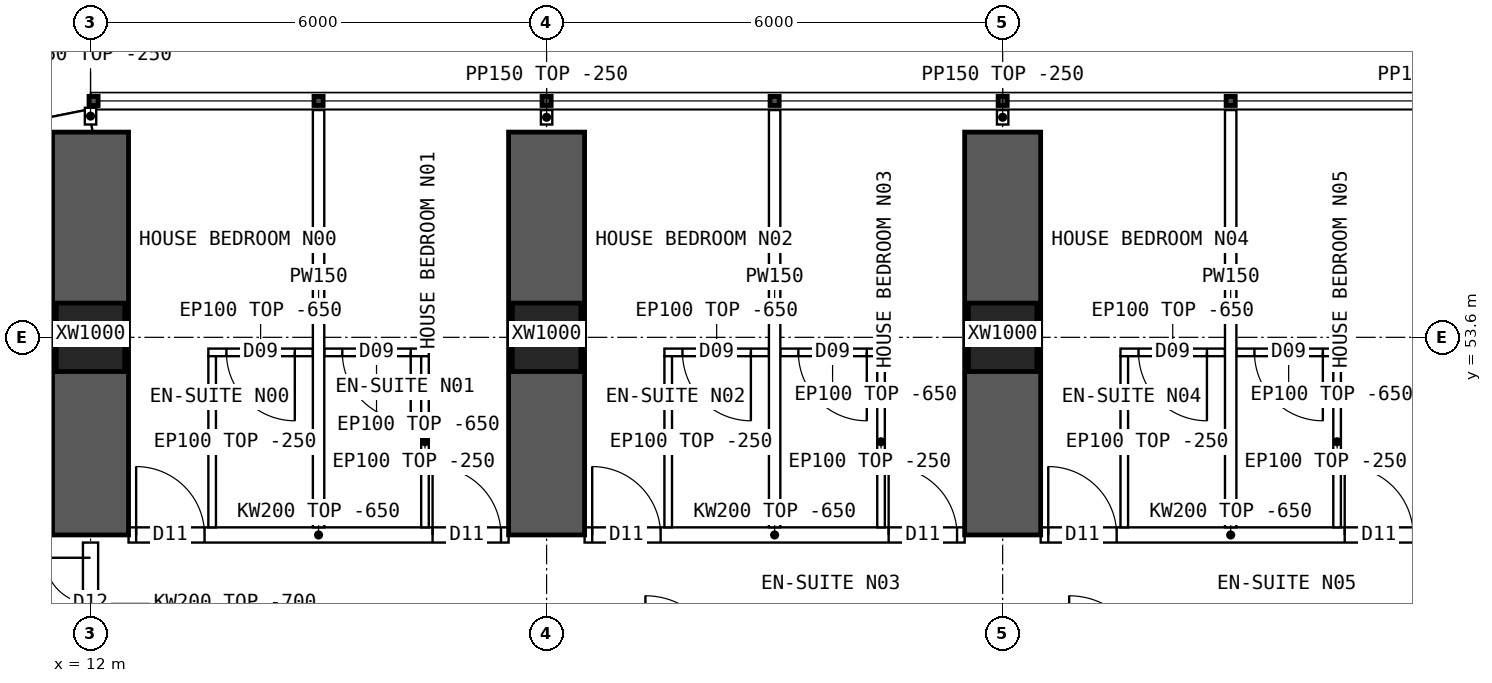
"""IFC4 building model, lengths in metres.
Left out: names, types, materials, properties, quantities, classifications, styles, units other than length and angle.
Written with IfcOpenShell. Run it as: python <this file> out.ifc"""

import sys

from ifc_helpers import new_model, si_unit, direction, frame, frame_2d, origin, origin_2d, place, context, subcontext, project, spatial, polyline, rectangle, hollow_rectangle, outline, extrude, element, fill, save


model = new_model("IFC4")
c1 = context("Model", 3, precision=1e-05, world=origin(), true_north=direction((0.0, 1.0)))
c2 = subcontext(c1, "Body", "Model", "MODEL_VIEW")
j1 = project(units=[si_unit("LENGTHUNIT", "METRE"), si_unit("PLANEANGLEUNIT", "RADIAN")], contexts=[c1])
p1 = place(None, origin())
s1 = spatial("IfcSite", under=j1, at=p1, CompositionType="ELEMENT")
p2 = place(p1, origin())
s2 = spatial("IfcBuilding", under=s1, at=p2, CompositionType="ELEMENT")
p3 = place(p2, frame((0.0, 0.0, 31.45)))
s3 = spatial("IfcBuildingStorey", under=s2, at=p3, CompositionType="ELEMENT", Elevation=31.45)
for number, where, z_axis, x_axis in (
    (1, (12.0, 53.6, 0.0), (0.0, 0.0, 1.0), (1.0, 0.0, 0.0)),
    (2, (18.0, 53.6, 0.0), (0.0, 0.0, 1.0), (1.0, 0.0, 0.0)),
    (3, (24.0, 53.6, 0.0), (0.0, 0.0, 1.0), (1.0, 0.0, 0.0)),
):
    element("IfcColumn", number, at=place(p3, frame(where, z_axis=z_axis, x_axis=x_axis)), inside=s3, PredefinedType="COLUMN", context=c2, shape_type="SweptSolid", body=[
        extrude(hollow_rectangle(XDim=0.9, YDim=0.9, WallThickness=0.09, at=origin_2d()), origin(), (0.0, 0.0, 1.0), 3.75),
    ])
for number, where, z_axis, x_axis in (
    (4, (12.0, 51.0, 0.0), (0.0, 0.0, 1.0), (0.0, 1.0, 0.0)),
    (5, (18.0, 51.0, 0.0), (0.0, 0.0, 1.0), (0.0, 1.0, 0.0)),
    (6, (24.0, 51.0, 0.0), (0.0, 0.0, 1.0), (0.0, 1.0, 0.0)),
):
    element("IfcWall", number, at=place(p3, frame(where, z_axis=z_axis, x_axis=x_axis)), inside=s3, PredefinedType="SHEAR", context=c2, shape_type="SweptSolid", body=[
        extrude(rectangle(XDim=5.3, YDim=1.0, at=frame_2d((2.65, 0.0))), origin(), (0.0, 0.0, 1.0), 3.75),
    ])
p4 = place(p3, frame((12.0, 56.45, 0.0), z_axis=(0.0, 0.0, 1.0), x_axis=(-0.980787251524, -0.195080412259, 0.0)))
e7 = element("IfcWall", 7, at=p4, inside=s3, PredefinedType="SOLIDWALL", context=c2, shape_type="SweptSolid", body=[
    extrude(outline(polyline([(-0.03, -0.15), (3.249, -0.15), (3.189, 0.15), (0.03, 0.15), (-0.03, -0.15)])), origin(), (0.0, 0.0, 1.0), 3.5),
])
p5 = place(p4, frame((0.909, 0.0, 0.9)))
e8 = element("IfcOpeningElement", 8, at=p5, cuts=e7, PredefinedType="OPENING", context=c2, shape_type="SweptSolid", body=[
    extrude(rectangle(XDim=1.4, YDim=1.8, at=frame_2d((0.7, 0.9))), frame((0.0, 0.16, 0.0), z_axis=(0.0, -1.0, 0.0), x_axis=(1.0, 0.0, 0.0)), (0.0, 0.0, 1.0), 0.32),
])
p6 = place(p3, frame((12.5, 51.0, 0.0), z_axis=(0.0, 0.0, 1.0), x_axis=(1.0, 0.0, 0.0)))
e9 = element("IfcWall", 9, at=p6, inside=s3, PredefinedType="SOLIDWALL", context=c2, shape_type="SweptSolid", body=[
    extrude(outline(polyline([(0.0, 0.0), (5.0, 0.0), (5.0, 3.1), (0.0, 3.1), (0.0, 0.0)])), frame((0.0, 0.1, 0.0), z_axis=(0.0, -1.0, 0.0), x_axis=(1.0, 0.0, 0.0)), (0.0, 0.0, 1.0), 0.2),
])
p7 = place(p6, frame((0.1, 0.0, 0.0)))
e10 = element("IfcOpeningElement", 10, at=p7, cuts=e9, PredefinedType="OPENING", context=c2, shape_type="SweptSolid", body=[
    extrude(rectangle(XDim=0.9, YDim=2.1, at=frame_2d((0.45, 1.05))), frame((0.0, 0.11, 0.0), z_axis=(0.0, -1.0, 0.0), x_axis=(1.0, 0.0, 0.0)), (0.0, 0.0, 1.0), 0.22),
])
p8 = place(p6, frame((4.0, 0.0, 0.0)))
e11 = element("IfcOpeningElement", 11, at=p8, cuts=e9, PredefinedType="OPENING", context=c2, shape_type="SweptSolid", body=[
    extrude(rectangle(XDim=0.9, YDim=2.1, at=frame_2d((0.45, 1.05))), frame((0.0, 0.11, 0.0), z_axis=(0.0, -1.0, 0.0), x_axis=(1.0, 0.0, 0.0)), (0.0, 0.0, 1.0), 0.22),
])
p9 = place(p3, frame((18.5, 51.0, 0.0), z_axis=(0.0, 0.0, 1.0), x_axis=(1.0, 0.0, 0.0)))
e12 = element("IfcWall", 12, at=p9, inside=s3, PredefinedType="SOLIDWALL", context=c2, shape_type="SweptSolid", body=[
    extrude(outline(polyline([(0.0, 0.0), (5.0, 0.0), (5.0, 3.1), (0.0, 3.1), (0.0, 0.0)])), frame((0.0, 0.1, 0.0), z_axis=(0.0, -1.0, 0.0), x_axis=(1.0, 0.0, 0.0)), (0.0, 0.0, 1.0), 0.2),
])
p10 = place(p9, frame((0.1, 0.0, 0.0)))
e13 = element("IfcOpeningElement", 13, at=p10, cuts=e12, PredefinedType="OPENING", context=c2, shape_type="SweptSolid", body=[
    extrude(rectangle(XDim=0.9, YDim=2.1, at=frame_2d((0.45, 1.05))), frame((0.0, 0.11, 0.0), z_axis=(0.0, -1.0, 0.0), x_axis=(1.0, 0.0, 0.0)), (0.0, 0.0, 1.0), 0.22),
])
p11 = place(p9, frame((4.0, 0.0, 0.0)))
e14 = element("IfcOpeningElement", 14, at=p11, cuts=e12, PredefinedType="OPENING", context=c2, shape_type="SweptSolid", body=[
    extrude(rectangle(XDim=0.9, YDim=2.1, at=frame_2d((0.45, 1.05))), frame((0.0, 0.11, 0.0), z_axis=(0.0, -1.0, 0.0), x_axis=(1.0, 0.0, 0.0)), (0.0, 0.0, 1.0), 0.22),
])
p12 = place(p3, frame((24.5, 51.0, 0.0), z_axis=(0.0, 0.0, 1.0), x_axis=(1.0, 0.0, 0.0)))
e15 = element("IfcWall", 15, at=p12, inside=s3, PredefinedType="SOLIDWALL", context=c2, shape_type="SweptSolid", body=[
    extrude(outline(polyline([(0.0, 0.0), (5.0, 0.0), (5.0, 3.1), (0.0, 3.1), (0.0, 0.0)])), frame((0.0, 0.1, 0.0), z_axis=(0.0, -1.0, 0.0), x_axis=(1.0, 0.0, 0.0)), (0.0, 0.0, 1.0), 0.2),
])
p13 = place(p12, frame((0.1, 0.0, 0.0)))
e16 = element("IfcOpeningElement", 16, at=p13, cuts=e15, PredefinedType="OPENING", context=c2, shape_type="SweptSolid", body=[
    extrude(rectangle(XDim=0.9, YDim=2.1, at=frame_2d((0.45, 1.05))), frame((0.0, 0.11, 0.0), z_axis=(0.0, -1.0, 0.0), x_axis=(1.0, 0.0, 0.0)), (0.0, 0.0, 1.0), 0.22),
])
p14 = place(p12, frame((4.0, 0.0, 0.0)))
e17 = element("IfcOpeningElement", 17, at=p14, cuts=e15, PredefinedType="OPENING", context=c2, shape_type="SweptSolid", body=[
    extrude(rectangle(XDim=0.9, YDim=2.1, at=frame_2d((0.45, 1.05))), frame((0.0, 0.11, 0.0), z_axis=(0.0, -1.0, 0.0), x_axis=(1.0, 0.0, 0.0)), (0.0, 0.0, 1.0), 0.22),
])
p15 = place(p3, frame((15.0, 56.59, 0.0), z_axis=(0.0, 0.0, 1.0), x_axis=(0.0, -1.0, 0.0)))
e18 = element("IfcWall", 18, at=p15, inside=s3, PredefinedType="PARTITIONING", context=c2, shape_type="SweptSolid", body=[
    extrude(outline(polyline([(0.0, 0.0), (5.49, 0.0), (5.49, 3.1), (5.442, 3.1), (5.44, 3.5), (3.192, 3.5), (3.19, 3.1), (2.792, 3.1), (2.79, 3.5), (0.0, 3.5), (0.0, 0.0)])), frame((0.0, 0.075, 0.0), z_axis=(0.0, -1.0, 0.0), x_axis=(1.0, 0.0, 0.0)), (0.0, 0.0, 1.0), 0.15),
])
p16 = place(p3, frame((13.55, 53.402, 0.0), z_axis=(0.0, 0.0, 1.0), x_axis=(1.0, 0.0, 0.0)))
e19 = element("IfcWall", 19, at=p16, inside=s3, PredefinedType="PARTITIONING", context=c2, shape_type="SweptSolid", body=[
    extrude(outline(polyline([(0.0, 0.0), (1.375, 0.0), (1.375, 3.1), (0.0, 3.1), (0.0, 0.0)])), frame((0.0, 0.05, 0.0), z_axis=(0.0, -1.0, 0.0), x_axis=(1.0, 0.0, 0.0)), (0.0, 0.0, 1.0), 0.1),
])
p17 = place(p16, frame((0.238, 0.0, 0.0)))
e20 = element("IfcOpeningElement", 20, at=p17, cuts=e19, PredefinedType="OPENING", context=c2, shape_type="SweptSolid", body=[
    extrude(rectangle(XDim=0.9, YDim=2.1, at=frame_2d((0.45, 1.05))), frame((0.0, 0.06, 0.0), z_axis=(0.0, -1.0, 0.0), x_axis=(1.0, 0.0, 0.0)), (0.0, 0.0, 1.0), 0.12),
])
p18 = place(p3, frame((13.6, 53.352, 0.0), z_axis=(0.0, 0.0, 1.0), x_axis=(0.0, -1.0, 0.0)))
e21 = element("IfcWall", 21, at=p18, inside=s3, PredefinedType="PARTITIONING", context=c2, shape_type="SweptSolid", body=[
    extrude(outline(polyline([(0.0, 0.0), (2.252, 0.0), (2.252, 3.1), (2.204, 3.1), (2.202, 3.5), (0.0, 3.5), (0.0, 0.0)])), frame((0.0, 0.05, 0.0), z_axis=(0.0, -1.0, 0.0), x_axis=(1.0, 0.0, 0.0)), (0.0, 0.0, 1.0), 0.1),
])
p19 = place(p3, frame((15.075, 53.402, 0.0), z_axis=(0.0, 0.0, 1.0), x_axis=(1.0, 0.0, 0.0)))
e22 = element("IfcWall", 22, at=p19, inside=s3, PredefinedType="PARTITIONING", context=c2, shape_type="SweptSolid", body=[
    extrude(outline(polyline([(0.0, 0.0), (1.375, 0.0), (1.375, 3.1), (0.0, 3.1), (0.0, 0.0)])), frame((0.0, 0.05, 0.0), z_axis=(0.0, -1.0, 0.0), x_axis=(1.0, 0.0, 0.0)), (0.0, 0.0, 1.0), 0.1),
])
p20 = place(p19, frame((0.238, 0.0, 0.0)))
e23 = element("IfcOpeningElement", 23, at=p20, cuts=e22, PredefinedType="OPENING", context=c2, shape_type="SweptSolid", body=[
    extrude(rectangle(XDim=0.9, YDim=2.1, at=frame_2d((0.45, 1.05))), frame((0.0, 0.06, 0.0), z_axis=(0.0, -1.0, 0.0), x_axis=(1.0, 0.0, 0.0)), (0.0, 0.0, 1.0), 0.12),
])
p21 = place(p3, frame((16.4, 53.352, 0.0), z_axis=(0.0, 0.0, 1.0), x_axis=(0.0, -1.0, 0.0)))
e24 = element("IfcWall", 24, at=p21, inside=s3, PredefinedType="PARTITIONING", context=c2, shape_type="SweptSolid", body=[
    extrude(outline(polyline([(0.0, 0.0), (2.252, 0.0), (2.252, 3.1), (2.204, 3.1), (2.202, 3.5), (0.0, 3.5), (0.0, 0.0)])), frame((0.0, 0.05, 0.0), z_axis=(0.0, -1.0, 0.0), x_axis=(1.0, 0.0, 0.0)), (0.0, 0.0, 1.0), 0.1),
])
p22 = place(p3, frame((21.0, 56.59, 0.0), z_axis=(0.0, 0.0, 1.0), x_axis=(0.0, -1.0, 0.0)))
e25 = element("IfcWall", 25, at=p22, inside=s3, PredefinedType="PARTITIONING", context=c2, shape_type="SweptSolid", body=[
    extrude(outline(polyline([(0.0, 0.0), (5.49, 0.0), (5.49, 3.1), (5.442, 3.1), (5.44, 3.5), (3.192, 3.5), (3.19, 3.1), (2.792, 3.1), (2.79, 3.5), (0.0, 3.5), (0.0, 0.0)])), frame((0.0, 0.075, 0.0), z_axis=(0.0, -1.0, 0.0), x_axis=(1.0, 0.0, 0.0)), (0.0, 0.0, 1.0), 0.15),
])
p23 = place(p3, frame((19.55, 53.402, 0.0), z_axis=(0.0, 0.0, 1.0), x_axis=(1.0, 0.0, 0.0)))
e26 = element("IfcWall", 26, at=p23, inside=s3, PredefinedType="PARTITIONING", context=c2, shape_type="SweptSolid", body=[
    extrude(outline(polyline([(0.0, 0.0), (1.375, 0.0), (1.375, 3.1), (0.0, 3.1), (0.0, 0.0)])), frame((0.0, 0.05, 0.0), z_axis=(0.0, -1.0, 0.0), x_axis=(1.0, 0.0, 0.0)), (0.0, 0.0, 1.0), 0.1),
])
p24 = place(p23, frame((0.238, 0.0, 0.0)))
e27 = element("IfcOpeningElement", 27, at=p24, cuts=e26, PredefinedType="OPENING", context=c2, shape_type="SweptSolid", body=[
    extrude(rectangle(XDim=0.9, YDim=2.1, at=frame_2d((0.45, 1.05))), frame((0.0, 0.06, 0.0), z_axis=(0.0, -1.0, 0.0), x_axis=(1.0, 0.0, 0.0)), (0.0, 0.0, 1.0), 0.12),
])
p25 = place(p3, frame((19.6, 53.352, 0.0), z_axis=(0.0, 0.0, 1.0), x_axis=(0.0, -1.0, 0.0)))
e28 = element("IfcWall", 28, at=p25, inside=s3, PredefinedType="PARTITIONING", context=c2, shape_type="SweptSolid", body=[
    extrude(outline(polyline([(0.0, 0.0), (2.252, 0.0), (2.252, 3.1), (2.204, 3.1), (2.202, 3.5), (0.0, 3.5), (0.0, 0.0)])), frame((0.0, 0.05, 0.0), z_axis=(0.0, -1.0, 0.0), x_axis=(1.0, 0.0, 0.0)), (0.0, 0.0, 1.0), 0.1),
])
p26 = place(p3, frame((21.075, 53.402, 0.0), z_axis=(0.0, 0.0, 1.0), x_axis=(1.0, 0.0, 0.0)))
e29 = element("IfcWall", 29, at=p26, inside=s3, PredefinedType="PARTITIONING", context=c2, shape_type="SweptSolid", body=[
    extrude(outline(polyline([(0.0, 0.0), (1.375, 0.0), (1.375, 3.1), (0.0, 3.1), (0.0, 0.0)])), frame((0.0, 0.05, 0.0), z_axis=(0.0, -1.0, 0.0), x_axis=(1.0, 0.0, 0.0)), (0.0, 0.0, 1.0), 0.1),
])
p27 = place(p26, frame((0.238, 0.0, 0.0)))
e30 = element("IfcOpeningElement", 30, at=p27, cuts=e29, PredefinedType="OPENING", context=c2, shape_type="SweptSolid", body=[
    extrude(rectangle(XDim=0.9, YDim=2.1, at=frame_2d((0.45, 1.05))), frame((0.0, 0.06, 0.0), z_axis=(0.0, -1.0, 0.0), x_axis=(1.0, 0.0, 0.0)), (0.0, 0.0, 1.0), 0.12),
])
p28 = place(p3, frame((22.4, 53.352, 0.0), z_axis=(0.0, 0.0, 1.0), x_axis=(0.0, -1.0, 0.0)))
e31 = element("IfcWall", 31, at=p28, inside=s3, PredefinedType="PARTITIONING", context=c2, shape_type="SweptSolid", body=[
    extrude(outline(polyline([(0.0, 0.0), (2.252, 0.0), (2.252, 3.1), (2.204, 3.1), (2.202, 3.5), (0.0, 3.5), (0.0, 0.0)])), frame((0.0, 0.05, 0.0), z_axis=(0.0, -1.0, 0.0), x_axis=(1.0, 0.0, 0.0)), (0.0, 0.0, 1.0), 0.1),
])
p29 = place(p3, frame((27.0, 56.59, 0.0), z_axis=(0.0, 0.0, 1.0), x_axis=(0.0, -1.0, 0.0)))
e32 = element("IfcWall", 32, at=p29, inside=s3, PredefinedType="PARTITIONING", context=c2, shape_type="SweptSolid", body=[
    extrude(outline(polyline([(0.0, 0.0), (5.49, 0.0), (5.49, 3.1), (5.442, 3.1), (5.44, 3.5), (3.192, 3.5), (3.19, 3.1), (2.792, 3.1), (2.79, 3.5), (0.0, 3.5), (0.0, 0.0)])), frame((0.0, 0.075, 0.0), z_axis=(0.0, -1.0, 0.0), x_axis=(1.0, 0.0, 0.0)), (0.0, 0.0, 1.0), 0.15),
])
p30 = place(p3, frame((25.55, 53.402, 0.0), z_axis=(0.0, 0.0, 1.0), x_axis=(1.0, 0.0, 0.0)))
e33 = element("IfcWall", 33, at=p30, inside=s3, PredefinedType="PARTITIONING", context=c2, shape_type="SweptSolid", body=[
    extrude(outline(polyline([(0.0, 0.0), (1.375, 0.0), (1.375, 3.1), (0.0, 3.1), (0.0, 0.0)])), frame((0.0, 0.05, 0.0), z_axis=(0.0, -1.0, 0.0), x_axis=(1.0, 0.0, 0.0)), (0.0, 0.0, 1.0), 0.1),
])
p31 = place(p30, frame((0.238, 0.0, 0.0)))
e34 = element("IfcOpeningElement", 34, at=p31, cuts=e33, PredefinedType="OPENING", context=c2, shape_type="SweptSolid", body=[
    extrude(rectangle(XDim=0.9, YDim=2.1, at=frame_2d((0.45, 1.05))), frame((0.0, 0.06, 0.0), z_axis=(0.0, -1.0, 0.0), x_axis=(1.0, 0.0, 0.0)), (0.0, 0.0, 1.0), 0.12),
])
p32 = place(p3, frame((25.6, 53.352, 0.0), z_axis=(0.0, 0.0, 1.0), x_axis=(0.0, -1.0, 0.0)))
e35 = element("IfcWall", 35, at=p32, inside=s3, PredefinedType="PARTITIONING", context=c2, shape_type="SweptSolid", body=[
    extrude(outline(polyline([(0.0, 0.0), (2.252, 0.0), (2.252, 3.1), (2.204, 3.1), (2.202, 3.5), (0.0, 3.5), (0.0, 0.0)])), frame((0.0, 0.05, 0.0), z_axis=(0.0, -1.0, 0.0), x_axis=(1.0, 0.0, 0.0)), (0.0, 0.0, 1.0), 0.1),
])
p33 = place(p3, frame((27.075, 53.402, 0.0), z_axis=(0.0, 0.0, 1.0), x_axis=(1.0, 0.0, 0.0)))
e36 = element("IfcWall", 36, at=p33, inside=s3, PredefinedType="PARTITIONING", context=c2, shape_type="SweptSolid", body=[
    extrude(outline(polyline([(0.0, 0.0), (1.375, 0.0), (1.375, 3.1), (0.0, 3.1), (0.0, 0.0)])), frame((0.0, 0.05, 0.0), z_axis=(0.0, -1.0, 0.0), x_axis=(1.0, 0.0, 0.0)), (0.0, 0.0, 1.0), 0.1),
])
p34 = place(p33, frame((0.238, 0.0, 0.0)))
e37 = element("IfcOpeningElement", 37, at=p34, cuts=e36, PredefinedType="OPENING", context=c2, shape_type="SweptSolid", body=[
    extrude(rectangle(XDim=0.9, YDim=2.1, at=frame_2d((0.45, 1.05))), frame((0.0, 0.06, 0.0), z_axis=(0.0, -1.0, 0.0), x_axis=(1.0, 0.0, 0.0)), (0.0, 0.0, 1.0), 0.12),
])
p35 = place(p3, frame((28.4, 53.352, 0.0), z_axis=(0.0, 0.0, 1.0), x_axis=(0.0, -1.0, 0.0)))
e38 = element("IfcWall", 38, at=p35, inside=s3, PredefinedType="PARTITIONING", context=c2, shape_type="SweptSolid", body=[
    extrude(outline(polyline([(0.0, 0.0), (2.252, 0.0), (2.252, 3.1), (2.204, 3.1), (2.202, 3.5), (0.0, 3.5), (0.0, 0.0)])), frame((0.0, 0.05, 0.0), z_axis=(0.0, -1.0, 0.0), x_axis=(1.0, 0.0, 0.0)), (0.0, 0.0, 1.0), 0.1),
])
p36 = place(p3, frame((12.0, 49.3, 0.0), z_axis=(0.0, 0.0, 1.0), x_axis=(0.0, 1.0, 0.0)))
e39 = element("IfcWall", 39, at=p36, inside=s3, PredefinedType="SOLIDWALL", context=c2, shape_type="SweptSolid", body=[
    extrude(outline(polyline([(0.0, 0.0), (1.6, 0.0), (1.6, 3.05), (0.0, 3.05), (0.0, 0.0)])), frame((0.0, 0.1, 0.0), z_axis=(0.0, -1.0, 0.0), x_axis=(1.0, 0.0, 0.0)), (0.0, 0.0, 1.0), 0.2),
])
p37 = place(p36, frame((0.2, 0.0, 0.0)))
e40 = element("IfcOpeningElement", 40, at=p37, cuts=e39, PredefinedType="OPENING", context=c2, shape_type="SweptSolid", body=[
    extrude(rectangle(XDim=1.2, YDim=2.1, at=frame_2d((0.6, 1.05))), frame((0.0, 0.11, 0.0), z_axis=(0.0, -1.0, 0.0), x_axis=(1.0, 0.0, 0.0)), (0.0, 0.0, 1.0), 0.22),
])
p38 = place(p3, frame((12.0, 56.4, 0.0), z_axis=(0.0, 0.0, 1.0), x_axis=(0.0, 1.0, 0.0)))
e41 = element("IfcWall", 41, at=p38, inside=s3, PredefinedType="PARTITIONING", context=c2, shape_type="SweptSolid", body=[
    extrude(rectangle(XDim=0.22, YDim=0.15, at=frame_2d((0.11, 0.0))), origin(), (0.0, 0.0, 1.0), 3.5),
])
for number, where, z_axis, x_axis in (
    (42, (18.0, 56.4, 0.0), (0.0, 0.0, 1.0), (0.0, 1.0, 0.0)),
    (43, (24.0, 56.4, 0.0), (0.0, 0.0, 1.0), (0.0, 1.0, 0.0)),
):
    element("IfcWall", number, at=place(p3, frame(where, z_axis=z_axis, x_axis=x_axis)), inside=s3, PredefinedType="PARTITIONING", context=c2, shape_type="SweptSolid", body=[
        extrude(rectangle(XDim=0.19, YDim=0.15, at=frame_2d((0.095, 0.0))), origin(), (0.0, 0.0, 1.0), 3.5),
    ])
p39 = place(p17, origin())
e44 = element("IfcDoor", 44, at=p39, inside=s3, OperationType="SINGLE_SWING_RIGHT", PredefinedType="DOOR", context=c2, shape_type="SweptSolid", body=[
    extrude(rectangle(XDim=0.9, YDim=2.1, at=frame_2d((0.45, 1.05))), frame((0.0, 0.025, 0.0), z_axis=(0.0, -1.0, 0.0), x_axis=(1.0, 0.0, 0.0)), (0.0, 0.0, 1.0), 0.05),
])
fill(e20, e44)
p40 = place(p7, origin())
e45 = element("IfcDoor", 45, at=p40, inside=s3, OperationType="SINGLE_SWING_LEFT", PredefinedType="DOOR", context=c2, shape_type="SweptSolid", body=[
    extrude(rectangle(XDim=0.9, YDim=2.1, at=frame_2d((0.45, 1.05))), frame((0.0, 0.025, 0.0), z_axis=(0.0, -1.0, 0.0), x_axis=(1.0, 0.0, 0.0)), (0.0, 0.0, 1.0), 0.05),
])
fill(e10, e45)
p41 = place(p20, origin())
e46 = element("IfcDoor", 46, at=p41, inside=s3, OperationType="SINGLE_SWING_RIGHT", PredefinedType="DOOR", context=c2, shape_type="SweptSolid", body=[
    extrude(rectangle(XDim=0.9, YDim=2.1, at=frame_2d((0.45, 1.05))), frame((0.0, 0.025, 0.0), z_axis=(0.0, -1.0, 0.0), x_axis=(1.0, 0.0, 0.0)), (0.0, 0.0, 1.0), 0.05),
])
fill(e23, e46)
p42 = place(p8, origin())
e47 = element("IfcDoor", 47, at=p42, inside=s3, OperationType="SINGLE_SWING_LEFT", PredefinedType="DOOR", context=c2, shape_type="SweptSolid", body=[
    extrude(rectangle(XDim=0.9, YDim=2.1, at=frame_2d((0.45, 1.05))), frame((0.0, 0.025, 0.0), z_axis=(0.0, -1.0, 0.0), x_axis=(1.0, 0.0, 0.0)), (0.0, 0.0, 1.0), 0.05),
])
fill(e11, e47)
p43 = place(p24, origin())
e48 = element("IfcDoor", 48, at=p43, inside=s3, OperationType="SINGLE_SWING_RIGHT", PredefinedType="DOOR", context=c2, shape_type="SweptSolid", body=[
    extrude(rectangle(XDim=0.9, YDim=2.1, at=frame_2d((0.45, 1.05))), frame((0.0, 0.025, 0.0), z_axis=(0.0, -1.0, 0.0), x_axis=(1.0, 0.0, 0.0)), (0.0, 0.0, 1.0), 0.05),
])
fill(e27, e48)
p44 = place(p10, origin())
e49 = element("IfcDoor", 49, at=p44, inside=s3, OperationType="SINGLE_SWING_LEFT", PredefinedType="DOOR", context=c2, shape_type="SweptSolid", body=[
    extrude(rectangle(XDim=0.9, YDim=2.1, at=frame_2d((0.45, 1.05))), frame((0.0, 0.025, 0.0), z_axis=(0.0, -1.0, 0.0), x_axis=(1.0, 0.0, 0.0)), (0.0, 0.0, 1.0), 0.05),
])
fill(e13, e49)
p45 = place(p27, origin())
e50 = element("IfcDoor", 50, at=p45, inside=s3, OperationType="SINGLE_SWING_RIGHT", PredefinedType="DOOR", context=c2, shape_type="SweptSolid", body=[
    extrude(rectangle(XDim=0.9, YDim=2.1, at=frame_2d((0.45, 1.05))), frame((0.0, 0.025, 0.0), z_axis=(0.0, -1.0, 0.0), x_axis=(1.0, 0.0, 0.0)), (0.0, 0.0, 1.0), 0.05),
])
fill(e30, e50)
p46 = place(p11, origin())
e51 = element("IfcDoor", 51, at=p46, inside=s3, OperationType="SINGLE_SWING_LEFT", PredefinedType="DOOR", context=c2, shape_type="SweptSolid", body=[
    extrude(rectangle(XDim=0.9, YDim=2.1, at=frame_2d((0.45, 1.05))), frame((0.0, 0.025, 0.0), z_axis=(0.0, -1.0, 0.0), x_axis=(1.0, 0.0, 0.0)), (0.0, 0.0, 1.0), 0.05),
])
fill(e14, e51)
p47 = place(p31, origin())
e52 = element("IfcDoor", 52, at=p47, inside=s3, OperationType="SINGLE_SWING_RIGHT", PredefinedType="DOOR", context=c2, shape_type="SweptSolid", body=[
    extrude(rectangle(XDim=0.9, YDim=2.1, at=frame_2d((0.45, 1.05))), frame((0.0, 0.025, 0.0), z_axis=(0.0, -1.0, 0.0), x_axis=(1.0, 0.0, 0.0)), (0.0, 0.0, 1.0), 0.05),
])
fill(e34, e52)
p48 = place(p13, origin())
e53 = element("IfcDoor", 53, at=p48, inside=s3, OperationType="SINGLE_SWING_LEFT", PredefinedType="DOOR", context=c2, shape_type="SweptSolid", body=[
    extrude(rectangle(XDim=0.9, YDim=2.1, at=frame_2d((0.45, 1.05))), frame((0.0, 0.025, 0.0), z_axis=(0.0, -1.0, 0.0), x_axis=(1.0, 0.0, 0.0)), (0.0, 0.0, 1.0), 0.05),
])
fill(e16, e53)
p49 = place(p34, origin())
e54 = element("IfcDoor", 54, at=p49, inside=s3, OperationType="SINGLE_SWING_RIGHT", PredefinedType="DOOR", context=c2, shape_type="SweptSolid", body=[
    extrude(rectangle(XDim=0.9, YDim=2.1, at=frame_2d((0.45, 1.05))), frame((0.0, 0.025, 0.0), z_axis=(0.0, -1.0, 0.0), x_axis=(1.0, 0.0, 0.0)), (0.0, 0.0, 1.0), 0.05),
])
fill(e37, e54)
p50 = place(p14, origin())
e55 = element("IfcDoor", 55, at=p50, inside=s3, OperationType="SINGLE_SWING_LEFT", PredefinedType="DOOR", context=c2, shape_type="SweptSolid", body=[
    extrude(rectangle(XDim=0.9, YDim=2.1, at=frame_2d((0.45, 1.05))), frame((0.0, 0.025, 0.0), z_axis=(0.0, -1.0, 0.0), x_axis=(1.0, 0.0, 0.0)), (0.0, 0.0, 1.0), 0.05),
])
fill(e17, e55)
p51 = place(p37, origin())
e56 = element("IfcDoor", 56, at=p51, inside=s3, OperationType="DOUBLE_DOOR_SINGLE_SWING", PredefinedType="DOOR", context=c2, shape_type="SweptSolid", body=[
    extrude(rectangle(XDim=1.2, YDim=2.1, at=frame_2d((0.6, 1.05))), frame((0.0, 0.025, 0.0), z_axis=(0.0, -1.0, 0.0), x_axis=(1.0, 0.0, 0.0)), (0.0, 0.0, 1.0), 0.05),
])
fill(e40, e56)
save(model, sys.argv[1])
